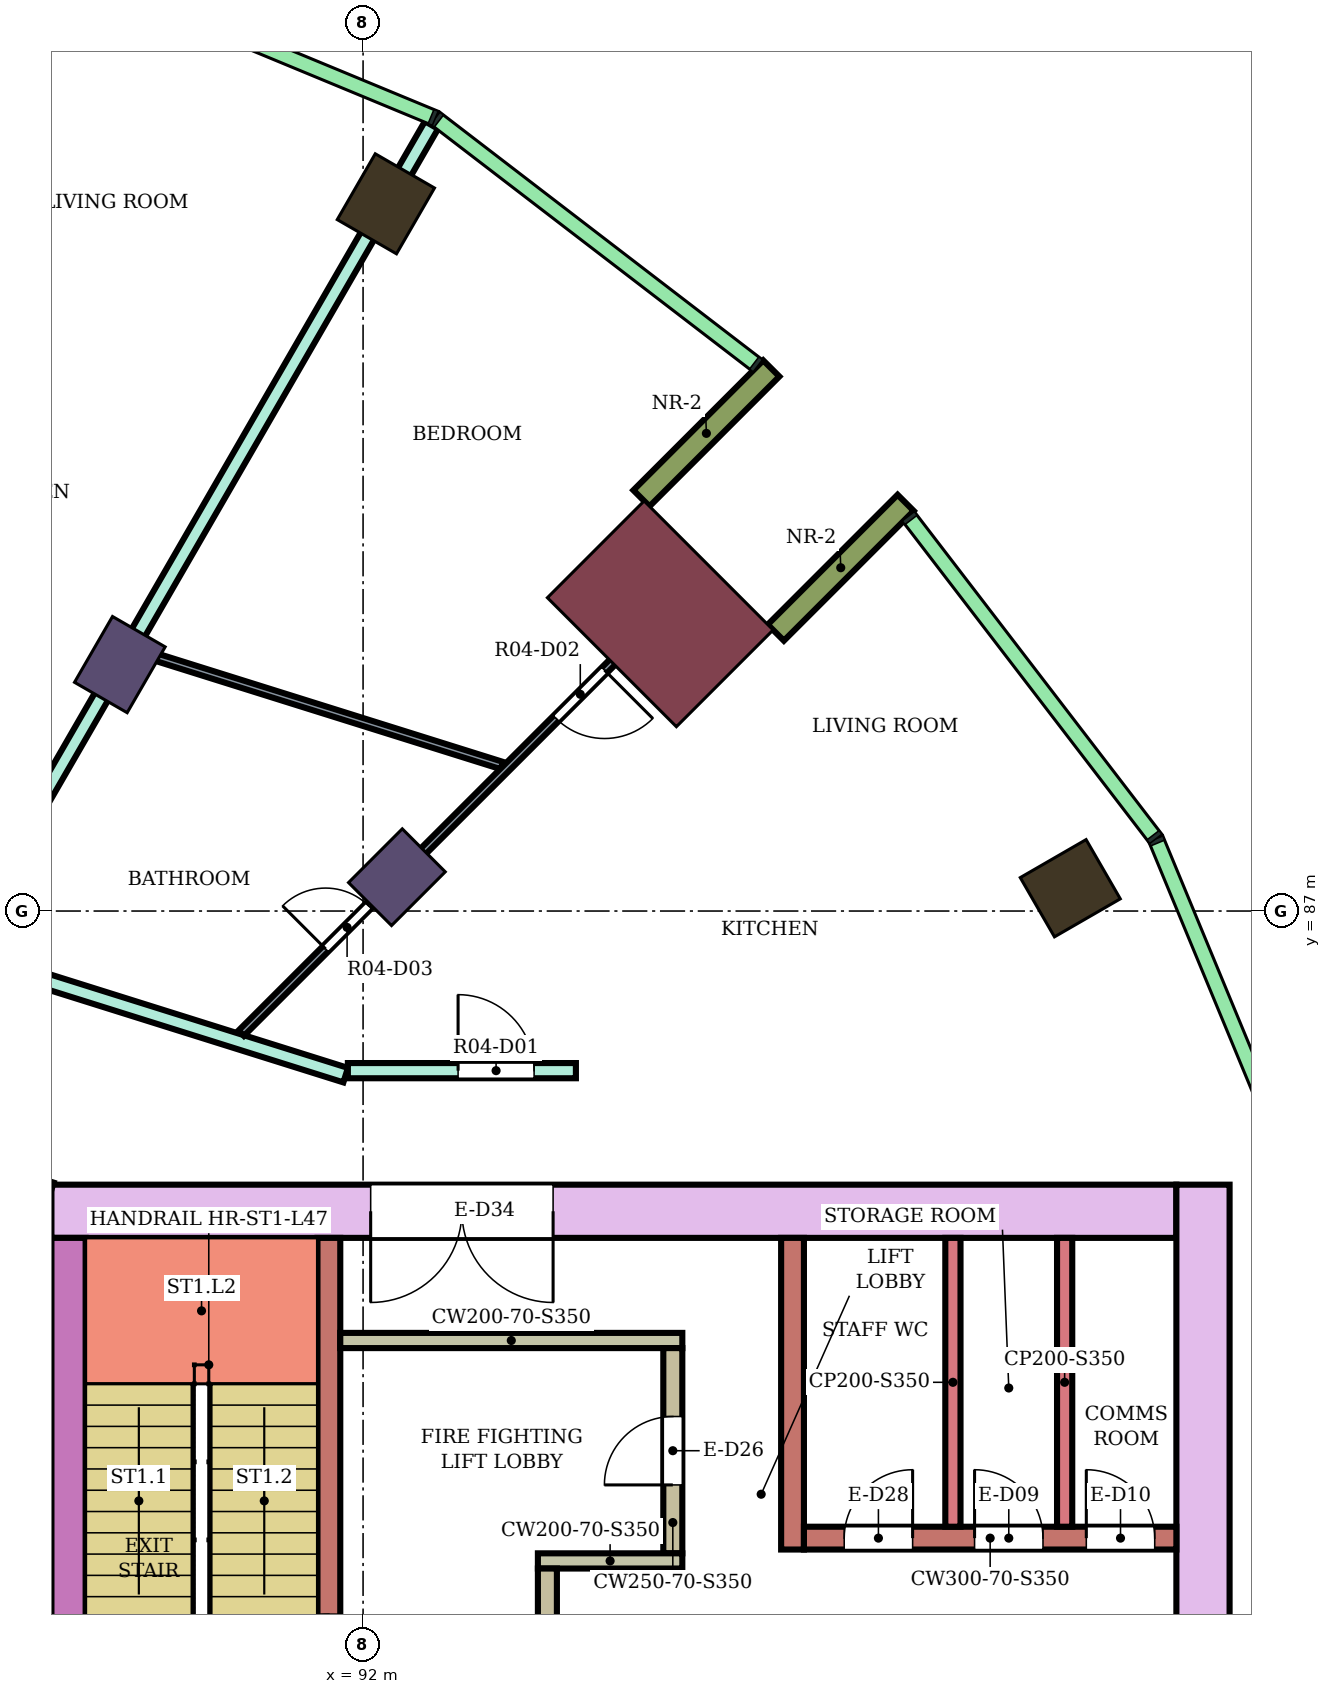
"""IFC4 building model, lengths in metres.
Left out: names, types, materials, properties, quantities, classifications, styles, units other than length and angle.
Written with IfcOpenShell. Run it as: python <this file> out.ifc"""

import sys

from ifc_helpers import new_model, si_unit, direction, frame, frame_2d, origin, origin_2d, place, context, subcontext, project, spatial, rectangle, extrude, element, fill, save


model = new_model("IFC4")
c1 = context("Model", 3, precision=1e-05, world=origin(), true_north=direction((0.0, 1.0)))
c2 = subcontext(c1, "Body", "Model", "MODEL_VIEW")
j1 = project(units=[si_unit("LENGTHUNIT", "METRE"), si_unit("PLANEANGLEUNIT", "RADIAN")], contexts=[c1])
p1 = place(None, origin())
s1 = spatial("IfcSite", under=j1, at=p1, CompositionType="ELEMENT")
p2 = place(p1, origin())
s2 = spatial("IfcBuilding", under=s1, at=p2, CompositionType="ELEMENT")
p3 = place(p2, frame((0.0, 0.0, 202.8)))
s3 = spatial("IfcBuildingStorey", under=s2, at=p3, CompositionType="ELEMENT", Elevation=202.8)
for number, where, z_axis, x_axis in (
    (1, (101.304, 87.3, 0.0), (0.0, 0.0, 1.0), (0.866, 0.5, 0.0)),
    (2, (92.3, 96.304, 0.0), (0.0, 0.0, 1.0), (0.5, 0.866, 0.0)),
):
    element("IfcColumn", number, at=place(p3, frame(where, z_axis=z_axis, x_axis=x_axis)), inside=s3, PredefinedType="COLUMN", context=c2, shape_type="SweptSolid", body=[
        extrude(rectangle(XDim=1.0, YDim=0.9, at=origin_2d()), origin(), (0.0, 0.0, 1.0), 4.1),
    ])
for number, where, z_axis, x_axis in (
    (3, (92.445, 87.445, 0.0), (0.0, 0.0, 1.0), (0.707, 0.707, 0.0)),
    (4, (88.8, 90.242, 0.0), (0.0, 0.0, 1.0), (0.5, 0.866, 0.0)),
):
    element("IfcColumn", number, at=place(p3, frame(where, z_axis=z_axis, x_axis=x_axis)), inside=s3, PredefinedType="COLUMN", context=c2, shape_type="SweptSolid", body=[
        extrude(rectangle(XDim=1.0, YDim=0.8, at=origin_2d()), origin(), (0.0, 0.0, 1.0), 4.1),
    ])
p4 = place(p3, frame((95.91, 90.91, 0.0), z_axis=(0.0, 0.0, 1.0), x_axis=(0.707106781187, 0.707106781187, 0.0)))
e5 = element("IfcColumn", 5, at=p4, inside=s3, PredefinedType="COLUMN", context=c2, shape_type="SweptSolid", body=[
    extrude(rectangle(XDim=1.8, YDim=2.4, at=origin_2d()), origin(), (0.0, 0.0, 1.0), 4.1),
])
p5 = place(p3, frame((87.9, 83.05, 0.0), z_axis=(0.0, 0.0, 1.0), x_axis=(1.0, 0.0, 0.0)))
e6 = element("IfcWall", 6, at=p5, inside=s3, PredefinedType="SHEAR", context=c2, shape_type="SweptSolid", body=[
    extrude(rectangle(XDim=14.8, YDim=0.7, at=frame_2d((7.4, 0.0))), origin(), (0.0, 0.0, 1.0), 3.75),
])
p6 = place(p5, frame((4.2, 0.0, 0.0)))
e7 = element("IfcOpeningElement", 7, at=p6, cuts=e6, PredefinedType="OPENING", context=c2, shape_type="SweptSolid", body=[
    extrude(rectangle(XDim=2.4, YDim=2.4, at=frame_2d((1.2, 1.2))), frame((0.0, 0.36, 0.0), z_axis=(0.0, -1.0, 0.0), x_axis=(1.0, 0.0, 0.0)), (0.0, 0.0, 1.0), 0.72),
])
p7 = place(p3, frame((88.125, 75.0, 0.0), z_axis=(0.0, 0.0, 1.0), x_axis=(0.0, 1.0, 0.0)))
e8 = element("IfcWall", 8, at=p7, inside=s3, PredefinedType="SHEAR", context=c2, shape_type="SweptSolid", body=[
    extrude(rectangle(XDim=7.7, YDim=0.45, at=frame_2d((3.85, 0.0))), origin(), (0.0, 0.0, 1.0), 3.75),
])
p8 = place(p3, frame((103.05, 66.6, 0.0), z_axis=(0.0, 0.0, 1.0), x_axis=(0.0, 1.0, 0.0)))
e9 = element("IfcWall", 9, at=p8, inside=s3, PredefinedType="SHEAR", context=c2, shape_type="SweptSolid", body=[
    extrude(rectangle(XDim=16.8, YDim=0.7, at=frame_2d((8.4, 0.0))), origin(), (0.0, 0.0, 1.0), 3.75),
])
p9 = place(p3, frame((91.55, 75.0, 0.0), z_axis=(0.0, 0.0, 1.0), x_axis=(0.0, 1.0, 0.0)))
e10 = element("IfcWall", 10, at=p9, inside=s3, PredefinedType="SHEAR", context=c2, shape_type="SweptSolid", body=[
    extrude(rectangle(XDim=7.7, YDim=0.3, at=frame_2d((3.85, 0.0))), origin(), (0.0, 0.0, 1.0), 3.75),
])
p10 = place(p9, frame((1.85, 0.0, 0.0)))
e11 = element("IfcOpeningElement", 11, at=p10, cuts=e10, PredefinedType="OPENING", context=c2, shape_type="SweptSolid", body=[
    extrude(rectangle(XDim=0.9, YDim=2.1, at=frame_2d((0.45, 1.05))), frame((0.0, 0.16, 0.0), z_axis=(0.0, -1.0, 0.0), x_axis=(1.0, 0.0, 0.0)), (0.0, 0.0, 1.0), 0.32),
])
p11 = place(p3, frame((91.7, 81.35, 0.0), z_axis=(0.0, 0.0, 1.0), x_axis=(1.0, 0.0, 0.0)))
e12 = element("IfcWall", 12, at=p11, inside=s3, PredefinedType="SHEAR", context=c2, shape_type="SweptSolid", body=[
    extrude(rectangle(XDim=4.5, YDim=0.2, at=frame_2d((2.25, 0.0))), origin(), (0.0, 0.0, 1.0), 3.75),
])
p12 = place(p3, frame((96.075, 78.55, 0.0), z_axis=(0.0, 0.0, 1.0), x_axis=(0.0, 1.0, 0.0)))
e13 = element("IfcWall", 13, at=p12, inside=s3, PredefinedType="SHEAR", context=c2, shape_type="SweptSolid", body=[
    extrude(rectangle(XDim=2.7, YDim=0.25, at=frame_2d((1.35, 0.0))), origin(), (0.0, 0.0, 1.0), 3.75),
])
p13 = place(p12, frame((0.9, 0.0, 0.0)))
e14 = element("IfcOpeningElement", 14, at=p13, cuts=e13, PredefinedType="OPENING", context=c2, shape_type="SweptSolid", body=[
    extrude(rectangle(XDim=0.9, YDim=2.1, at=frame_2d((0.45, 1.05))), frame((0.0, 0.135, 0.0), z_axis=(0.0, -1.0, 0.0), x_axis=(1.0, 0.0, 0.0)), (0.0, 0.0, 1.0), 0.27),
])
p14 = place(p3, frame((94.3, 78.45, 0.0), z_axis=(0.0, 0.0, 1.0), x_axis=(1.0, 0.0, 0.0)))
e15 = element("IfcWall", 15, at=p14, inside=s3, PredefinedType="SHEAR", context=c2, shape_type="SweptSolid", body=[
    extrude(rectangle(XDim=1.9, YDim=0.2, at=frame_2d((0.95, 0.0))), origin(), (0.0, 0.0, 1.0), 3.75),
])
p15 = place(p3, frame((94.425, 76.85, 0.0), z_axis=(0.0, 0.0, 1.0), x_axis=(0.0, 1.0, 0.0)))
e16 = element("IfcWall", 16, at=p15, inside=s3, PredefinedType="SHEAR", context=c2, shape_type="SweptSolid", body=[
    extrude(rectangle(XDim=1.5, YDim=0.25, at=frame_2d((0.75, 0.0))), origin(), (0.0, 0.0, 1.0), 3.75),
])
p16 = place(p3, frame((97.65, 78.6, 0.0), z_axis=(0.0, 0.0, 1.0), x_axis=(0.0, 1.0, 0.0)))
e17 = element("IfcWall", 17, at=p16, inside=s3, PredefinedType="SHEAR", context=c2, shape_type="SweptSolid", body=[
    extrude(rectangle(XDim=4.1, YDim=0.3, at=frame_2d((2.05, 0.0))), origin(), (0.0, 0.0, 1.0), 3.75),
])
p17 = place(p3, frame((97.8, 78.75, 0.0), z_axis=(0.0, 0.0, 1.0), x_axis=(1.0, 0.0, 0.0)))
e18 = element("IfcWall", 18, at=p17, inside=s3, PredefinedType="SHEAR", context=c2, shape_type="SweptSolid", body=[
    extrude(rectangle(XDim=4.9, YDim=0.3, at=frame_2d((2.45, 0.0))), origin(), (0.0, 0.0, 1.0), 3.75),
])
p18 = place(p17, frame((0.53, 0.0, 0.0)))
e19 = element("IfcOpeningElement", 19, at=p18, cuts=e18, PredefinedType="OPENING", context=c2, shape_type="SweptSolid", body=[
    extrude(rectangle(XDim=0.9, YDim=2.1, at=frame_2d((0.45, 1.05))), frame((0.0, 0.16, 0.0), z_axis=(0.0, -1.0, 0.0), x_axis=(1.0, 0.0, 0.0)), (0.0, 0.0, 1.0), 0.32),
])
p19 = place(p17, frame((2.245, 0.0, 0.0)))
e20 = element("IfcOpeningElement", 20, at=p19, cuts=e18, PredefinedType="OPENING", context=c2, shape_type="SweptSolid", body=[
    extrude(rectangle(XDim=0.9, YDim=2.1, at=frame_2d((0.45, 1.05))), frame((0.0, 0.16, 0.0), z_axis=(0.0, -1.0, 0.0), x_axis=(1.0, 0.0, 0.0)), (0.0, 0.0, 1.0), 0.32),
])
p20 = place(p17, frame((3.715, 0.0, 0.0)))
e21 = element("IfcOpeningElement", 21, at=p20, cuts=e18, PredefinedType="OPENING", context=c2, shape_type="SweptSolid", body=[
    extrude(rectangle(XDim=0.9, YDim=2.1, at=frame_2d((0.45, 1.05))), frame((0.0, 0.16, 0.0), z_axis=(0.0, -1.0, 0.0), x_axis=(1.0, 0.0, 0.0)), (0.0, 0.0, 1.0), 0.32),
])
for number, where, z_axis, x_axis in (
    (22, (97.43, 90.662, 0.0), (0.0, 0.0, 1.0), (0.707, 0.707, 0.0)),
    (23, (95.662, 92.43, 0.0), (0.0, 0.0, 1.0), (0.707, 0.707, 0.0)),
):
    element("IfcWall", number, at=place(p3, frame(where, z_axis=z_axis, x_axis=x_axis)), inside=s3, PredefinedType="NOTDEFINED", context=c2, shape_type="SweptSolid", body=[
        extrude(rectangle(XDim=2.416, YDim=0.3, at=frame_2d((1.208, 0.0))), origin(), (0.0, 0.0, 1.0), 4.1),
    ])
p21 = place(p3, frame((85.587, 84.057, 0.0), z_axis=(0.0, 0.0, 1.0), x_axis=(0.954210767728, -0.299135104513, 0.0)))
e24 = element("IfcWall", 24, at=p21, inside=s3, PredefinedType="PARTITIONING", context=c2, shape_type="SweptSolid", body=[
    extrude(rectangle(XDim=2.424, YDim=0.2, at=frame_2d((1.212, 0.0))), origin(), (0.0, 0.0, 1.0), 3.65),
])
p22 = place(p3, frame((86.313, 86.554, 0.0), z_axis=(0.0, 0.0, 1.0), x_axis=(0.954081217458, -0.299548043717, 0.0)))
e25 = element("IfcWall", 25, at=p22, inside=s3, PredefinedType="PARTITIONING", context=c2, shape_type="SweptSolid", body=[
    extrude(rectangle(XDim=5.721, YDim=0.2, at=frame_2d((2.86, 0.0))), origin(), (0.0, 0.0, 1.0), 3.65),
])
p23 = place(p3, frame((86.676, 86.563, 0.0), z_axis=(0.0, 0.0, 1.0), x_axis=(0.500124310661, 0.865953621094, 0.0)))
e26 = element("IfcWall", 26, at=p23, inside=s3, PredefinedType="PARTITIONING", context=c2, shape_type="SweptSolid", body=[
    extrude(rectangle(XDim=12.446, YDim=0.2, at=frame_2d((6.223, 0.0))), origin(), (0.0, 0.0, 1.0), 3.65),
])
p24 = place(p3, frame((91.8, 84.9, 0.0), z_axis=(0.0, 0.0, 1.0), x_axis=(1.0, 0.0, 0.0)))
e27 = element("IfcWall", 27, at=p24, inside=s3, PredefinedType="PARTITIONING", context=c2, shape_type="SweptSolid", body=[
    extrude(rectangle(XDim=3.0, YDim=0.2, at=frame_2d((1.5, 0.0))), origin(), (0.0, 0.0, 1.0), 3.65),
])
p25 = place(p24, frame((1.45, 0.0, 0.0)))
e28 = element("IfcOpeningElement", 28, at=p25, cuts=e27, PredefinedType="OPENING", context=c2, shape_type="SweptSolid", body=[
    extrude(rectangle(XDim=1.0, YDim=2.1, at=frame_2d((0.5, 1.05))), frame((0.0, 0.11, 0.0), z_axis=(0.0, -1.0, 0.0), x_axis=(1.0, 0.0, 0.0)), (0.0, 0.0, 1.0), 0.22),
])
p26 = place(p3, frame((89.026, 90.419, 0.0), z_axis=(0.0, 0.0, 1.0), x_axis=(0.954217944154, -0.299112211476, 0.0)))
e29 = element("IfcWall", 29, at=p26, inside=s3, PredefinedType="PARTITIONING", context=c2, shape_type="SweptSolid", body=[
    extrude(rectangle(XDim=5.03, YDim=0.1, at=frame_2d((2.515, 0.0))), origin(), (0.0, 0.0, 1.0), 3.65),
])
p27 = place(p3, frame((90.397, 85.393, 0.0), z_axis=(0.0, 0.0, 1.0), x_axis=(0.707264750546, 0.706948776529, 0.0)))
e30 = element("IfcWall", 30, at=p27, inside=s3, PredefinedType="PARTITIONING", context=c2, shape_type="SweptSolid", body=[
    extrude(rectangle(XDim=8.499, YDim=0.1, at=frame_2d((4.25, 0.0))), origin(), (0.0, 0.0, 1.0), 3.65),
])
p28 = place(p27, frame((5.857, 0.0, 0.0)))
e31 = element("IfcOpeningElement", 31, at=p28, cuts=e30, PredefinedType="OPENING", context=c2, shape_type="SweptSolid", body=[
    extrude(rectangle(XDim=0.9, YDim=2.1, at=frame_2d((0.45, 1.05))), frame((0.0, 0.06, 0.0), z_axis=(0.0, -1.0, 0.0), x_axis=(1.0, 0.0, 0.0)), (0.0, 0.0, 1.0), 0.12),
])
p29 = place(p27, frame((1.569, 0.0, 0.0)))
e32 = element("IfcOpeningElement", 32, at=p29, cuts=e30, PredefinedType="OPENING", context=c2, shape_type="SweptSolid", body=[
    extrude(rectangle(XDim=0.8, YDim=2.1, at=frame_2d((0.4, 1.05))), frame((0.0, 0.06, 0.0), z_axis=(0.0, -1.0, 0.0), x_axis=(1.0, 0.0, 0.0)), (0.0, 0.0, 1.0), 0.12),
])
for number, where, z_axis, x_axis in (
    (33, (99.76, 78.9, 0.0), (0.0, 0.0, 1.0), (0.0, 1.0, 0.0)),
    (34, (101.23, 78.9, 0.0), (0.0, 0.0, 1.0), (0.0, 1.0, 0.0)),
):
    element("IfcWall", number, at=place(p3, frame(where, z_axis=z_axis, x_axis=x_axis)), inside=s3, PredefinedType="PARTITIONING", context=c2, shape_type="SweptSolid", body=[
        extrude(rectangle(XDim=3.8, YDim=0.2, at=frame_2d((1.9, 0.0))), origin(), (0.0, 0.0, 1.0), 3.75),
    ])
p30 = place(p25, origin())
e35 = element("IfcDoor", 35, at=p30, inside=s3, OperationType="SINGLE_SWING_LEFT", PredefinedType="DOOR", context=c2, shape_type="SweptSolid", body=[
    extrude(rectangle(XDim=1.0, YDim=2.1, at=frame_2d((0.5, 1.05))), frame((0.0, 0.025, 0.0), z_axis=(0.0, -1.0, 0.0), x_axis=(1.0, 0.0, 0.0)), (0.0, 0.0, 1.0), 0.05),
])
fill(e28, e35)
p31 = place(p28, frame((0.9, 0.0, 0.0), z_axis=(0.0, 0.0, 1.0), x_axis=(-1.0, 0.0, 0.0)))
e36 = element("IfcDoor", 36, at=p31, inside=s3, OperationType="SINGLE_SWING_LEFT", PredefinedType="DOOR", context=c2, shape_type="SweptSolid", body=[
    extrude(rectangle(XDim=0.9, YDim=2.1, at=frame_2d((0.45, 1.05))), frame((0.0, 0.025, 0.0), z_axis=(0.0, -1.0, 0.0), x_axis=(1.0, 0.0, 0.0)), (0.0, 0.0, 1.0), 0.05),
])
fill(e31, e36)
p32 = place(p29, origin())
e37 = element("IfcDoor", 37, at=p32, inside=s3, OperationType="SINGLE_SWING_LEFT", PredefinedType="DOOR", context=c2, shape_type="SweptSolid", body=[
    extrude(rectangle(XDim=0.8, YDim=2.1, at=frame_2d((0.4, 1.05))), frame((0.0, 0.025, 0.0), z_axis=(0.0, -1.0, 0.0), x_axis=(1.0, 0.0, 0.0)), (0.0, 0.0, 1.0), 0.05),
])
fill(e32, e37)
p33 = place(p13, origin())
e38 = element("IfcDoor", 38, at=p33, inside=s3, OperationType="SINGLE_SWING_LEFT", PredefinedType="DOOR", context=c2, shape_type="SweptSolid", body=[
    extrude(rectangle(XDim=0.9, YDim=2.1, at=frame_2d((0.45, 1.05))), frame((0.0, 0.025, 0.0), z_axis=(0.0, -1.0, 0.0), x_axis=(1.0, 0.0, 0.0)), (0.0, 0.0, 1.0), 0.05),
])
fill(e14, e38)
p34 = place(p18, origin())
e39 = element("IfcDoor", 39, at=p34, inside=s3, OperationType="SINGLE_SWING_RIGHT", PredefinedType="DOOR", context=c2, shape_type="SweptSolid", body=[
    extrude(rectangle(XDim=0.9, YDim=2.1, at=frame_2d((0.45, 1.05))), frame((0.0, 0.025, 0.0), z_axis=(0.0, -1.0, 0.0), x_axis=(1.0, 0.0, 0.0)), (0.0, 0.0, 1.0), 0.05),
])
fill(e19, e39)
p35 = place(p19, origin())
e40 = element("IfcDoor", 40, at=p35, inside=s3, OperationType="SINGLE_SWING_LEFT", PredefinedType="DOOR", context=c2, shape_type="SweptSolid", body=[
    extrude(rectangle(XDim=0.9, YDim=2.1, at=frame_2d((0.45, 1.05))), frame((0.0, 0.025, 0.0), z_axis=(0.0, -1.0, 0.0), x_axis=(1.0, 0.0, 0.0)), (0.0, 0.0, 1.0), 0.05),
])
fill(e20, e40)
p36 = place(p20, origin())
e41 = element("IfcDoor", 41, at=p36, inside=s3, OperationType="SINGLE_SWING_LEFT", PredefinedType="DOOR", context=c2, shape_type="SweptSolid", body=[
    extrude(rectangle(XDim=0.9, YDim=2.1, at=frame_2d((0.45, 1.05))), frame((0.0, 0.025, 0.0), z_axis=(0.0, -1.0, 0.0), x_axis=(1.0, 0.0, 0.0)), (0.0, 0.0, 1.0), 0.05),
])
fill(e21, e41)
p37 = place(p6, frame((2.4, 0.0, 0.0), z_axis=(0.0, 0.0, 1.0), x_axis=(-1.0, 0.0, 0.0)))
e42 = element("IfcDoor", 42, at=p37, inside=s3, OperationType="DOUBLE_DOOR_SINGLE_SWING", PredefinedType="DOOR", context=c2, shape_type="SweptSolid", body=[
    extrude(rectangle(XDim=2.4, YDim=2.4, at=frame_2d((1.2, 1.2))), frame((0.0, 0.025, 0.0), z_axis=(0.0, -1.0, 0.0), x_axis=(1.0, 0.0, 0.0)), (0.0, 0.0, 1.0), 0.05),
])
fill(e7, e42)
save(model, sys.argv[1])
